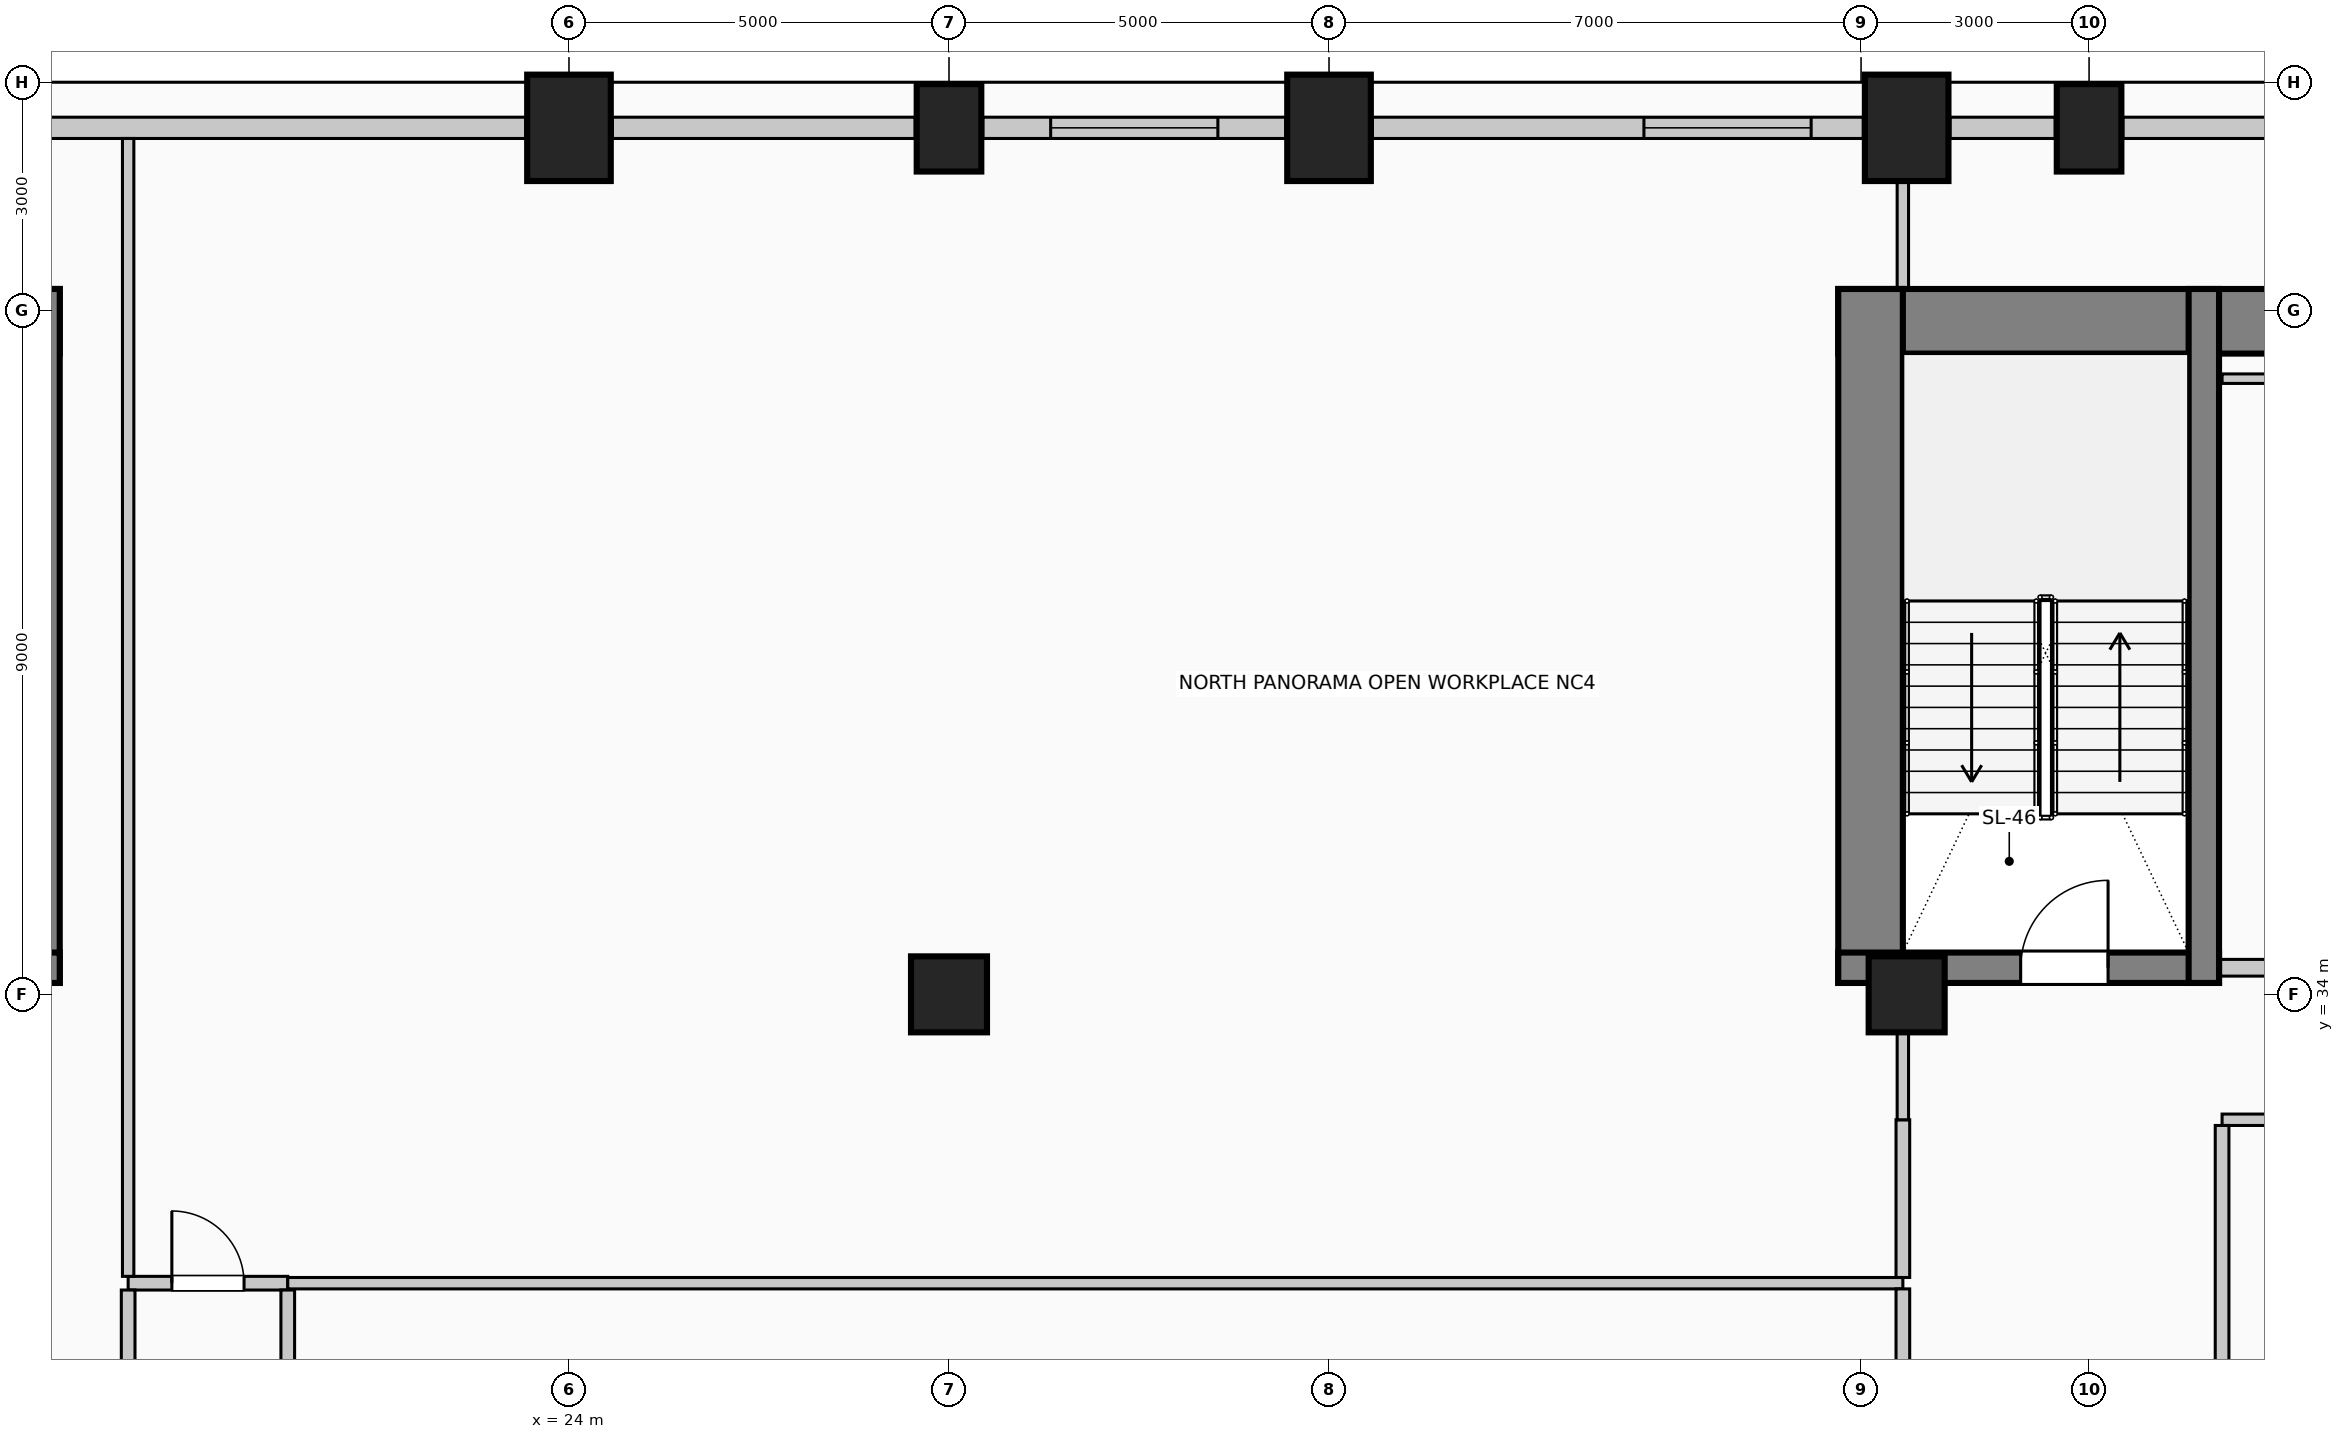
"""IFC4 building model, lengths in metres.
Left out: names, types, materials, properties, quantities, classifications, styles, units other than length and angle.
Written with IfcOpenShell. Run it as: python <this file> out.ifc"""

import sys

from ifc_helpers import new_model, si_unit, direction, frame, frame_2d, origin, origin_2d, place, context, subcontext, project, spatial, rectangle, circle, extrude, element, fill, save


model = new_model("IFC4")
c1 = context("Model", 3, precision=1e-05, world=origin(), true_north=direction((0.0, 1.0)))
c2 = subcontext(c1, "Body", "Model", "MODEL_VIEW")
j1 = project(units=[si_unit("LENGTHUNIT", "METRE"), si_unit("PLANEANGLEUNIT", "RADIAN")], contexts=[c1])
p1 = place(None, origin())
s1 = spatial("IfcSite", under=j1, at=p1, CompositionType="ELEMENT")
p2 = place(p1, origin())
s2 = spatial("IfcBuilding", under=s1, at=p2, CompositionType="ELEMENT")
p3 = place(p2, frame((0.0, 0.0, 100.6)))
s3 = spatial("IfcBuildingStorey", under=s2, at=p3, CompositionType="ELEMENT", Elevation=100.6)
p4 = place(p3, frame((2.7, 42.855, 0.0), z_axis=(0.0, 0.0, 1.0), x_axis=(1.0, 0.0, 0.0)))
e1 = element("IfcWall", 1, at=p4, inside=s3, PredefinedType="SHEAR", context=c2, shape_type="SweptSolid", body=[
    extrude(rectangle(XDim=14.6, YDim=0.85, at=frame_2d((7.3, 0.0))), origin(), (0.0, 0.0, 1.0), 4.0),
])
p5 = place(p3, frame((16.875, 34.15, 0.0), z_axis=(0.0, 0.0, 1.0), x_axis=(0.0, 1.0, 0.0)))
e2 = element("IfcWall", 2, at=p5, inside=s3, PredefinedType="SHEAR", context=c2, shape_type="SweptSolid", body=[
    extrude(rectangle(XDim=9.13, YDim=0.85, at=frame_2d((4.565, 0.0))), origin(), (0.0, 0.0, 1.0), 4.0),
])
p6 = place(p3, frame((12.29, 34.35, 0.0), z_axis=(0.0, 0.0, 1.0), x_axis=(1.0, 0.0, 0.0)))
e3 = element("IfcWall", 3, at=p6, inside=s3, PredefinedType="SHEAR", context=c2, shape_type="SweptSolid", body=[
    extrude(rectangle(XDim=5.01, YDim=0.4, at=frame_2d((2.505, 0.0))), origin(), (0.0, 0.0, 1.0), 4.0),
])
p7 = place(p6, frame((1.4, 0.0, 0.0)))
e4 = element("IfcOpeningElement", 4, at=p7, cuts=e3, PredefinedType="OPENING", context=c2, shape_type="SweptSolid", body=[
    extrude(rectangle(XDim=1.15, YDim=2.2, at=frame_2d((0.575, 1.1))), frame((0.0, 0.21, 0.0), z_axis=(0.0, -1.0, 0.0), x_axis=(1.0, 0.0, 0.0)), (0.0, 0.0, 1.0), 0.42),
])
p8 = place(p3, frame((40.7, 42.855, 0.0), z_axis=(0.0, 0.0, 1.0), x_axis=(1.0, 0.0, 0.0)))
e5 = element("IfcWall", 5, at=p8, inside=s3, PredefinedType="SHEAR", context=c2, shape_type="SweptSolid", body=[
    extrude(rectangle(XDim=14.6, YDim=0.85, at=frame_2d((7.3, 0.0))), origin(), (0.0, 0.0, 1.0), 4.0),
])
p9 = place(p3, frame((41.125, 34.15, 0.0), z_axis=(0.0, 0.0, 1.0), x_axis=(0.0, 1.0, 0.0)))
e6 = element("IfcWall", 6, at=p9, inside=s3, PredefinedType="SHEAR", context=c2, shape_type="SweptSolid", body=[
    extrude(rectangle(XDim=9.13, YDim=0.85, at=frame_2d((4.565, 0.0))), origin(), (0.0, 0.0, 1.0), 4.0),
])
p10 = place(p3, frame((40.7, 34.35, 0.0), z_axis=(0.0, 0.0, 1.0), x_axis=(1.0, 0.0, 0.0)))
e7 = element("IfcWall", 7, at=p10, inside=s3, PredefinedType="SHEAR", context=c2, shape_type="SweptSolid", body=[
    extrude(rectangle(XDim=5.01, YDim=0.4, at=frame_2d((2.505, 0.0))), origin(), (0.0, 0.0, 1.0), 4.0),
])
p11 = place(p10, frame((2.4, 0.0, 0.0)))
e8 = element("IfcOpeningElement", 8, at=p11, cuts=e7, PredefinedType="OPENING", context=c2, shape_type="SweptSolid", body=[
    extrude(rectangle(XDim=1.15, YDim=2.2, at=frame_2d((0.575, 1.1))), frame((0.0, 0.21, 0.0), z_axis=(0.0, -1.0, 0.0), x_axis=(1.0, 0.0, 0.0)), (0.0, 0.0, 1.0), 0.42),
])
p12 = place(p3, frame((45.51, 34.15, 0.0), z_axis=(0.0, 0.0, 1.0), x_axis=(0.0, 1.0, 0.0)))
e9 = element("IfcWall", 9, at=p12, inside=s3, PredefinedType="SHEAR", context=c2, shape_type="SweptSolid", body=[
    extrude(rectangle(XDim=9.13, YDim=0.4, at=frame_2d((4.565, 0.0))), origin(), (0.0, 0.0, 1.0), 4.0),
])
p13 = place(p3, frame((24.0, 45.4, 0.0), z_axis=(0.0, 0.0, 1.0), x_axis=(1.0, 0.0, 0.0)))
e10 = element("IfcColumn", 10, at=p13, inside=s3, PredefinedType="COLUMN", context=c2, shape_type="SweptSolid", body=[
    extrude(rectangle(XDim=1.1, YDim=1.4, at=origin_2d()), origin(), (0.0, 0.0, 1.0), 4.0),
])
p14 = place(p3, frame((29.0, 45.4, 0.0), z_axis=(0.0, 0.0, 1.0), x_axis=(1.0, 0.0, 0.0)))
e11 = element("IfcColumn", 11, at=p14, inside=s3, PredefinedType="COLUMN", context=c2, shape_type="SweptSolid", body=[
    extrude(rectangle(XDim=0.85, YDim=1.15, at=origin_2d()), origin(), (0.0, 0.0, 1.0), 4.0),
])
for number, where, z_axis, x_axis in (
    (12, (34.0, 45.4, 0.0), (0.0, 0.0, 1.0), (1.0, 0.0, 0.0)),
    (13, (41.6, 45.4, 0.0), (0.0, 0.0, 1.0), (1.0, 0.0, 0.0)),
):
    element("IfcColumn", number, at=place(p3, frame(where, z_axis=z_axis, x_axis=x_axis)), inside=s3, PredefinedType="COLUMN", context=c2, shape_type="SweptSolid", body=[
        extrude(rectangle(XDim=1.1, YDim=1.4, at=origin_2d()), origin(), (0.0, 0.0, 1.0), 4.0),
    ])
p15 = place(p3, frame((44.0, 45.4, 0.0), z_axis=(0.0, 0.0, 1.0), x_axis=(1.0, 0.0, 0.0)))
e14 = element("IfcColumn", 14, at=p15, inside=s3, PredefinedType="COLUMN", context=c2, shape_type="SweptSolid", body=[
    extrude(rectangle(XDim=0.85, YDim=1.15, at=origin_2d()), origin(), (0.0, 0.0, 1.0), 4.0),
])
for number, where, z_axis, x_axis in (
    (15, (29.0, 34.0, 0.0), (0.0, 0.0, 1.0), (1.0, 0.0, 0.0)),
    (16, (41.6, 34.0, 0.0), (0.0, 0.0, 1.0), (1.0, 0.0, 0.0)),
):
    element("IfcColumn", number, at=place(p3, frame(where, z_axis=z_axis, x_axis=x_axis)), inside=s3, PredefinedType="COLUMN", context=c2, shape_type="SweptSolid", body=[
        extrude(circle(Radius=0.5, at=origin_2d()), origin(), (0.0, 0.0, 1.0), 4.0),
    ])
p16 = place(p3, frame((16.97, 45.4, 0.0), z_axis=(0.0, 0.0, 1.0), x_axis=(1.0, 0.0, 0.0)))
e17 = element("IfcWall", 17, at=p16, inside=s3, PredefinedType="SOLIDWALL", context=c2, shape_type="SweptSolid", body=[
    extrude(rectangle(XDim=6.46, YDim=0.28, at=frame_2d((3.23, 0.0))), origin(), (0.0, 0.0, 1.0), 2.875),
])
p17 = place(p3, frame((24.57, 45.4, 0.0), z_axis=(0.0, 0.0, 1.0), x_axis=(1.0, 0.0, 0.0)))
e18 = element("IfcWall", 18, at=p17, inside=s3, PredefinedType="SOLIDWALL", context=c2, shape_type="SweptSolid", body=[
    extrude(rectangle(XDim=3.985, YDim=0.28, at=frame_2d((1.992, 0.0))), origin(), (0.0, 0.0, 1.0), 2.875),
])
p18 = place(p3, frame((29.445, 45.4, 0.0), z_axis=(0.0, 0.0, 1.0), x_axis=(1.0, 0.0, 0.0)))
e19 = element("IfcWall", 19, at=p18, inside=s3, PredefinedType="SOLIDWALL", context=c2, shape_type="SweptSolid", body=[
    extrude(rectangle(XDim=3.985, YDim=0.28, at=frame_2d((1.992, 0.0))), origin(), (0.0, 0.0, 1.0), 2.875),
])
p19 = place(p18, frame((0.893, 0.0, 0.5)))
e20 = element("IfcOpeningElement", 20, at=p19, cuts=e19, PredefinedType="OPENING", context=c2, shape_type="SweptSolid", body=[
    extrude(rectangle(XDim=2.2, YDim=1.95, at=frame_2d((1.1, 0.975))), frame((0.0, 0.15, 0.0), z_axis=(0.0, -1.0, 0.0), x_axis=(1.0, 0.0, 0.0)), (0.0, 0.0, 1.0), 0.3),
])
p20 = place(p3, frame((34.57, 45.4, 0.0), z_axis=(0.0, 0.0, 1.0), x_axis=(1.0, 0.0, 0.0)))
e21 = element("IfcWall", 21, at=p20, inside=s3, PredefinedType="SOLIDWALL", context=c2, shape_type="SweptSolid", body=[
    extrude(rectangle(XDim=6.46, YDim=0.28, at=frame_2d((3.23, 0.0))), origin(), (0.0, 0.0, 1.0), 2.875),
])
p21 = place(p20, frame((3.573, 0.0, 0.5)))
e22 = element("IfcOpeningElement", 22, at=p21, cuts=e21, PredefinedType="OPENING", context=c2, shape_type="SweptSolid", body=[
    extrude(rectangle(XDim=2.2, YDim=1.95, at=frame_2d((1.1, 0.975))), frame((0.0, 0.15, 0.0), z_axis=(0.0, -1.0, 0.0), x_axis=(1.0, 0.0, 0.0)), (0.0, 0.0, 1.0), 0.3),
])
p22 = place(p3, frame((42.17, 45.4, 0.0), z_axis=(0.0, 0.0, 1.0), x_axis=(1.0, 0.0, 0.0)))
e23 = element("IfcWall", 23, at=p22, inside=s3, PredefinedType="SOLIDWALL", context=c2, shape_type="SweptSolid", body=[
    extrude(rectangle(XDim=1.385, YDim=0.28, at=frame_2d((0.692, 0.0))), origin(), (0.0, 0.0, 1.0), 2.875),
])
p23 = place(p3, frame((44.445, 45.4, 0.0), z_axis=(0.0, 0.0, 1.0), x_axis=(1.0, 0.0, 0.0)))
e24 = element("IfcWall", 24, at=p23, inside=s3, PredefinedType="SOLIDWALL", context=c2, shape_type="SweptSolid", body=[
    extrude(rectangle(XDim=4.61, YDim=0.28, at=frame_2d((2.305, 0.0))), origin(), (0.0, 0.0, 1.0), 2.875),
])
p24 = place(p3, frame((45.72, 34.35, 0.0), z_axis=(0.0, 0.0, 1.0), x_axis=(1.0, 0.0, 0.0)))
e25 = element("IfcWall", 25, at=p24, inside=s3, PredefinedType="PARTITIONING", context=c2, shape_type="SweptSolid", body=[
    extrude(rectangle(XDim=4.56, YDim=0.22, at=frame_2d((2.28, 0.0))), origin(), (0.0, 0.0, 1.0), 3.725),
])
p25 = place(p24, frame((0.65, 0.0, 0.0)))
e26 = element("IfcOpeningElement", 26, at=p25, cuts=e25, PredefinedType="OPENING", context=c2, shape_type="SweptSolid", body=[
    extrude(rectangle(XDim=0.92, YDim=2.1, at=frame_2d((0.46, 1.05))), frame((0.0, 0.12, 0.0), z_axis=(0.0, -1.0, 0.0), x_axis=(1.0, 0.0, 0.0)), (0.0, 0.0, 1.0), 0.24),
])
p26 = place(p24, frame((2.95, 0.0, 0.0)))
e27 = element("IfcOpeningElement", 27, at=p26, cuts=e25, PredefinedType="OPENING", context=c2, shape_type="SweptSolid", body=[
    extrude(rectangle(XDim=0.88, YDim=2.1, at=frame_2d((0.44, 1.05))), frame((0.0, 0.12, 0.0), z_axis=(0.0, -1.0, 0.0), x_axis=(1.0, 0.0, 0.0)), (0.0, 0.0, 1.0), 0.24),
])
p27 = place(p3, frame((18.2, 30.2, 0.0), z_axis=(0.0, 0.0, 1.0), x_axis=(1.0, 0.0, 0.0)))
e28 = element("IfcWall", 28, at=p27, inside=s3, PredefinedType="PARTITIONING", context=c2, shape_type="SweptSolid", body=[
    extrude(rectangle(XDim=2.1, YDim=0.18, at=frame_2d((1.05, 0.0))), origin(), (0.0, 0.0, 1.0), 3.725),
])
p28 = place(p27, frame((0.575, 0.0, 0.0)))
e29 = element("IfcOpeningElement", 29, at=p28, cuts=e28, PredefinedType="OPENING", context=c2, shape_type="SweptSolid", body=[
    extrude(rectangle(XDim=0.95, YDim=2.15, at=frame_2d((0.475, 1.075))), frame((0.0, 0.1, 0.0), z_axis=(0.0, -1.0, 0.0), x_axis=(1.0, 0.0, 0.0)), (0.0, 0.0, 1.0), 0.2),
])
p29 = place(p3, frame((20.3, 30.2, 0.0), z_axis=(0.0, 0.0, 1.0), x_axis=(1.0, 0.0, 0.0)))
e30 = element("IfcWall", 30, at=p29, inside=s3, PredefinedType="PARTITIONING", context=c2, shape_type="SweptSolid", body=[
    extrude(rectangle(XDim=21.25, YDim=0.15, at=frame_2d((10.625, 0.0))), origin(), (0.0, 0.0, 1.0), 3.725),
])
p30 = place(p3, frame((45.75, 32.35, 0.0), z_axis=(0.0, 0.0, 1.0), x_axis=(1.0, 0.0, 0.0)))
e31 = element("IfcWall", 31, at=p30, inside=s3, PredefinedType="PARTITIONING", context=c2, shape_type="SweptSolid", body=[
    extrude(rectangle(XDim=8.7, YDim=0.15, at=frame_2d((4.35, 0.0))), origin(), (0.0, 0.0, 1.0), 3.725),
])
p31 = place(p30, frame((3.875, 0.0, 0.0)))
e32 = element("IfcOpeningElement", 32, at=p31, cuts=e31, PredefinedType="OPENING", context=c2, shape_type="SweptSolid", body=[
    extrude(rectangle(XDim=0.95, YDim=2.15, at=frame_2d((0.475, 1.075))), frame((0.0, 0.085, 0.0), z_axis=(0.0, -1.0, 0.0), x_axis=(1.0, 0.0, 0.0)), (0.0, 0.0, 1.0), 0.17),
])
p32 = place(p3, frame((45.75, 42.1, 0.0), z_axis=(0.0, 0.0, 1.0), x_axis=(1.0, 0.0, 0.0)))
e33 = element("IfcWall", 33, at=p32, inside=s3, PredefinedType="PARTITIONING", context=c2, shape_type="SweptSolid", body=[
    extrude(rectangle(XDim=2.25, YDim=0.125, at=frame_2d((1.125, 0.0))), origin(), (0.0, 0.0, 1.0), 3.725),
])
p33 = place(p3, frame((18.2, 15.74, 0.0), z_axis=(0.0, 0.0, 1.0), x_axis=(0.0, 1.0, 0.0)))
e34 = element("IfcWall", 34, at=p33, inside=s3, PredefinedType="PARTITIONING", context=c2, shape_type="SweptSolid", body=[
    extrude(rectangle(XDim=14.37, YDim=0.18, at=frame_2d((7.185, 0.0))), origin(), (0.0, 0.0, 1.0), 3.725),
])
p34 = place(p3, frame((18.2, 30.29, 0.0), z_axis=(0.0, 0.0, 1.0), x_axis=(0.0, 1.0, 0.0)))
e35 = element("IfcWall", 35, at=p34, inside=s3, PredefinedType="PARTITIONING", context=c2, shape_type="SweptSolid", body=[
    extrude(rectangle(XDim=14.97, YDim=0.15, at=frame_2d((7.485, 0.0))), origin(), (0.0, 0.0, 1.0), 3.725),
])
p35 = place(p3, frame((20.3, 15.74, 0.0), z_axis=(0.0, 0.0, 1.0), x_axis=(0.0, 1.0, 0.0)))
e36 = element("IfcWall", 36, at=p35, inside=s3, PredefinedType="PARTITIONING", context=c2, shape_type="SweptSolid", body=[
    extrude(rectangle(XDim=14.37, YDim=0.18, at=frame_2d((7.185, 0.0))), origin(), (0.0, 0.0, 1.0), 3.725),
])
p36 = place(p3, frame((41.55, 18.5, 0.0), z_axis=(0.0, 0.0, 1.0), x_axis=(0.0, 1.0, 0.0)))
e37 = element("IfcWall", 37, at=p36, inside=s3, PredefinedType="PARTITIONING", context=c2, shape_type="SweptSolid", body=[
    extrude(rectangle(XDim=11.625, YDim=0.18, at=frame_2d((5.812, 0.0))), origin(), (0.0, 0.0, 1.0), 3.07),
])
p37 = place(p3, frame((41.55, 30.275, 0.0), z_axis=(0.0, 0.0, 1.0), x_axis=(0.0, 1.0, 0.0)))
e38 = element("IfcWall", 38, at=p37, inside=s3, PredefinedType="PARTITIONING", context=c2, shape_type="SweptSolid", body=[
    extrude(rectangle(XDim=2.075, YDim=0.18, at=frame_2d((1.038, 0.0))), origin(), (0.0, 0.0, 1.0), 3.07),
])
p38 = place(p3, frame((41.55, 32.35, 0.0), z_axis=(0.0, 0.0, 1.0), x_axis=(0.0, 1.0, 0.0)))
e39 = element("IfcWall", 39, at=p38, inside=s3, PredefinedType="PARTITIONING", context=c2, shape_type="SweptSolid", body=[
    extrude(rectangle(XDim=1.15, YDim=0.15, at=frame_2d((0.575, 0.0))), origin(), (0.0, 0.0, 1.0), 3.07),
])
p39 = place(p3, frame((41.55, 43.28, 0.0), z_axis=(0.0, 0.0, 1.0), x_axis=(0.0, 1.0, 0.0)))
e40 = element("IfcWall", 40, at=p39, inside=s3, PredefinedType="PARTITIONING", context=c2, shape_type="SweptSolid", body=[
    extrude(rectangle(XDim=1.42, YDim=0.15, at=frame_2d((0.71, 0.0))), origin(), (0.0, 0.0, 1.0), 3.725),
])
p40 = place(p3, frame((45.75, 25.225, 0.0), z_axis=(0.0, 0.0, 1.0), x_axis=(0.0, 1.0, 0.0)))
e41 = element("IfcWall", 41, at=p40, inside=s3, PredefinedType="PARTITIONING", context=c2, shape_type="SweptSolid", body=[
    extrude(rectangle(XDim=7.05, YDim=0.18, at=frame_2d((3.525, 0.0))), origin(), (0.0, 0.0, 1.0), 3.725),
])
p41 = place(p19, origin())
e42 = element("IfcWindow", 42, at=p41, inside=s3, PartitioningType="SINGLE_PANEL", PredefinedType="WINDOW", context=c2, shape_type="SweptSolid", body=[
    extrude(rectangle(XDim=2.2, YDim=1.95, at=frame_2d((1.1, 0.975))), frame((0.0, 0.03, 0.0), z_axis=(0.0, -1.0, 0.0), x_axis=(1.0, 0.0, 0.0)), (0.0, 0.0, 1.0), 0.06),
])
fill(e20, e42)
p42 = place(p21, origin())
e43 = element("IfcWindow", 43, at=p42, inside=s3, PartitioningType="SINGLE_PANEL", PredefinedType="WINDOW", context=c2, shape_type="SweptSolid", body=[
    extrude(rectangle(XDim=2.2, YDim=1.95, at=frame_2d((1.1, 0.975))), frame((0.0, 0.03, 0.0), z_axis=(0.0, -1.0, 0.0), x_axis=(1.0, 0.0, 0.0)), (0.0, 0.0, 1.0), 0.06),
])
fill(e22, e43)
p43 = place(p11, origin())
e44 = element("IfcDoor", 44, at=p43, inside=s3, OperationType="SINGLE_SWING_RIGHT", PredefinedType="DOOR", context=c2, shape_type="SweptSolid", body=[
    extrude(rectangle(XDim=1.15, YDim=2.2, at=frame_2d((0.575, 1.1))), frame((0.0, 0.025, 0.0), z_axis=(0.0, -1.0, 0.0), x_axis=(1.0, 0.0, 0.0)), (0.0, 0.0, 1.0), 0.05),
])
fill(e8, e44)
p44 = place(p28, origin())
e45 = element("IfcDoor", 45, at=p44, inside=s3, OperationType="SINGLE_SWING_LEFT", PredefinedType="DOOR", context=c2, shape_type="SweptSolid", body=[
    extrude(rectangle(XDim=0.95, YDim=2.15, at=frame_2d((0.475, 1.075))), frame((0.0, 0.025, 0.0), z_axis=(0.0, -1.0, 0.0), x_axis=(1.0, 0.0, 0.0)), (0.0, 0.0, 1.0), 0.05),
])
fill(e29, e45)
save(model, sys.argv[1])
